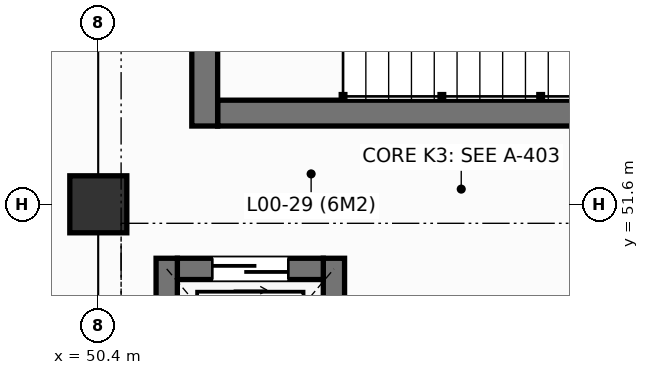
"""IFC4 building model, lengths in metres.
Left out: names, types, materials, properties, quantities, classifications, styles, units other than length and angle.
Written with IfcOpenShell. Run it as: python <this file> out.ifc"""

import sys

from ifc_helpers import new_model, si_unit, direction, frame, frame_2d, origin, origin_2d, place, context, subcontext, project, spatial, rectangle, extrude, element, fill, save


model = new_model("IFC4")
c1 = context("Model", 3, precision=1e-05, world=origin(), true_north=direction((0.0, 1.0)))
c2 = subcontext(c1, "Body", "Model", "MODEL_VIEW")
j1 = project(units=[si_unit("LENGTHUNIT", "METRE"), si_unit("PLANEANGLEUNIT", "RADIAN")], contexts=[c1])
p1 = place(None, origin())
s1 = spatial("IfcSite", under=j1, at=p1, CompositionType="ELEMENT")
p2 = place(p1, origin())
s2 = spatial("IfcBuilding", under=s1, at=p2, CompositionType="ELEMENT")
p3 = place(p2, origin())
s3 = spatial("IfcBuildingStorey", under=s2, at=p3, CompositionType="ELEMENT", Elevation=0.0)
p4 = place(p3, frame((50.4, 51.6, 0.0), z_axis=(0.0, 0.0, 1.0), x_axis=(1.0, 0.0, 0.0)))
e1 = element("IfcColumn", 1, at=p4, inside=s3, PredefinedType="COLUMN", context=c2, shape_type="SweptSolid", body=[
    extrude(rectangle(XDim=0.75, YDim=0.75, at=origin_2d()), origin(), (0.0, 0.0, 1.0), 4.8),
])
p5 = place(p3, frame((51.97, 52.8, 0.0), z_axis=(0.0, 0.0, 1.0), x_axis=(1.0, 0.0, 0.0)))
e2 = element("IfcWall", 2, at=p5, inside=s3, PredefinedType="SHEAR", context=c2, shape_type="SweptSolid", body=[
    extrude(rectangle(XDim=7.26, YDim=0.34, at=frame_2d((3.63, 0.0))), origin(), (0.0, 0.0, 1.0), 4.8),
])
p6 = place(p3, frame((51.8, 56.81, 0.0), z_axis=(0.0, 0.0, 1.0), x_axis=(0.0, -1.0, 0.0)))
e3 = element("IfcWall", 3, at=p6, inside=s3, PredefinedType="SHEAR", context=c2, shape_type="SweptSolid", body=[
    extrude(rectangle(XDim=4.18, YDim=0.34, at=frame_2d((2.09, 0.0))), origin(), (0.0, 0.0, 1.0), 4.8),
])
p7 = place(p6, frame((1.39, 0.0, 0.0)))
e4 = element("IfcOpeningElement", 4, at=p7, cuts=e3, PredefinedType="OPENING", context=c2, shape_type="SweptSolid", body=[
    extrude(rectangle(XDim=1.4, YDim=2.15, at=frame_2d((0.7, 1.075))), frame((0.0, 0.18, 0.0), z_axis=(0.0, -1.0, 0.0), x_axis=(1.0, 0.0, 0.0)), (0.0, 0.0, 1.0), 0.36),
])
p8 = place(p3, frame((53.5, 48.01, 0.0), z_axis=(0.0, 0.0, 1.0), x_axis=(0.0, 1.0, 0.0)))
e5 = element("IfcWall", 5, at=p8, inside=s3, PredefinedType="SHEAR", context=c2, shape_type="SweptSolid", body=[
    extrude(rectangle(XDim=2.88, YDim=0.28, at=frame_2d((1.44, 0.0))), origin(), (0.0, 0.0, 1.0), 4.8),
])
p9 = place(p3, frame((53.36, 50.75, 0.0), z_axis=(0.0, 0.0, 1.0), x_axis=(-1.0, 0.0, 0.0)))
e6 = element("IfcWall", 6, at=p9, inside=s3, PredefinedType="SHEAR", context=c2, shape_type="SweptSolid", body=[
    extrude(rectangle(XDim=1.92, YDim=0.28, at=frame_2d((0.96, 0.0))), origin(), (0.0, 0.0, 1.0), 4.8),
])
p10 = place(p9, frame((0.46, 0.0, 0.0)))
e7 = element("IfcOpeningElement", 7, at=p10, cuts=e6, PredefinedType="OPENING", context=c2, shape_type="SweptSolid", body=[
    extrude(rectangle(XDim=1.0, YDim=2.15, at=frame_2d((0.5, 1.075))), frame((0.0, 0.15, 0.0), z_axis=(0.0, -1.0, 0.0), x_axis=(1.0, 0.0, 0.0)), (0.0, 0.0, 1.0), 0.3),
])
p11 = place(p3, frame((51.3, 50.89, 0.0), z_axis=(0.0, 0.0, 1.0), x_axis=(0.0, -1.0, 0.0)))
e8 = element("IfcWall", 8, at=p11, inside=s3, PredefinedType="SHEAR", context=c2, shape_type="SweptSolid", body=[
    extrude(rectangle(XDim=2.88, YDim=0.28, at=frame_2d((1.44, 0.0))), origin(), (0.0, 0.0, 1.0), 4.8),
])
p12 = place(p10, origin())
e9 = element("IfcDoor", 9, at=p12, inside=s3, OperationType="SLIDING_TO_LEFT", PredefinedType="DOOR", context=c2, shape_type="SweptSolid", body=[
    extrude(rectangle(XDim=1.0, YDim=2.15, at=frame_2d((0.5, 1.075))), frame((0.0, 0.025, 0.0), z_axis=(0.0, -1.0, 0.0), x_axis=(1.0, 0.0, 0.0)), (0.0, 0.0, 1.0), 0.05),
])
fill(e7, e9)
save(model, sys.argv[1])
